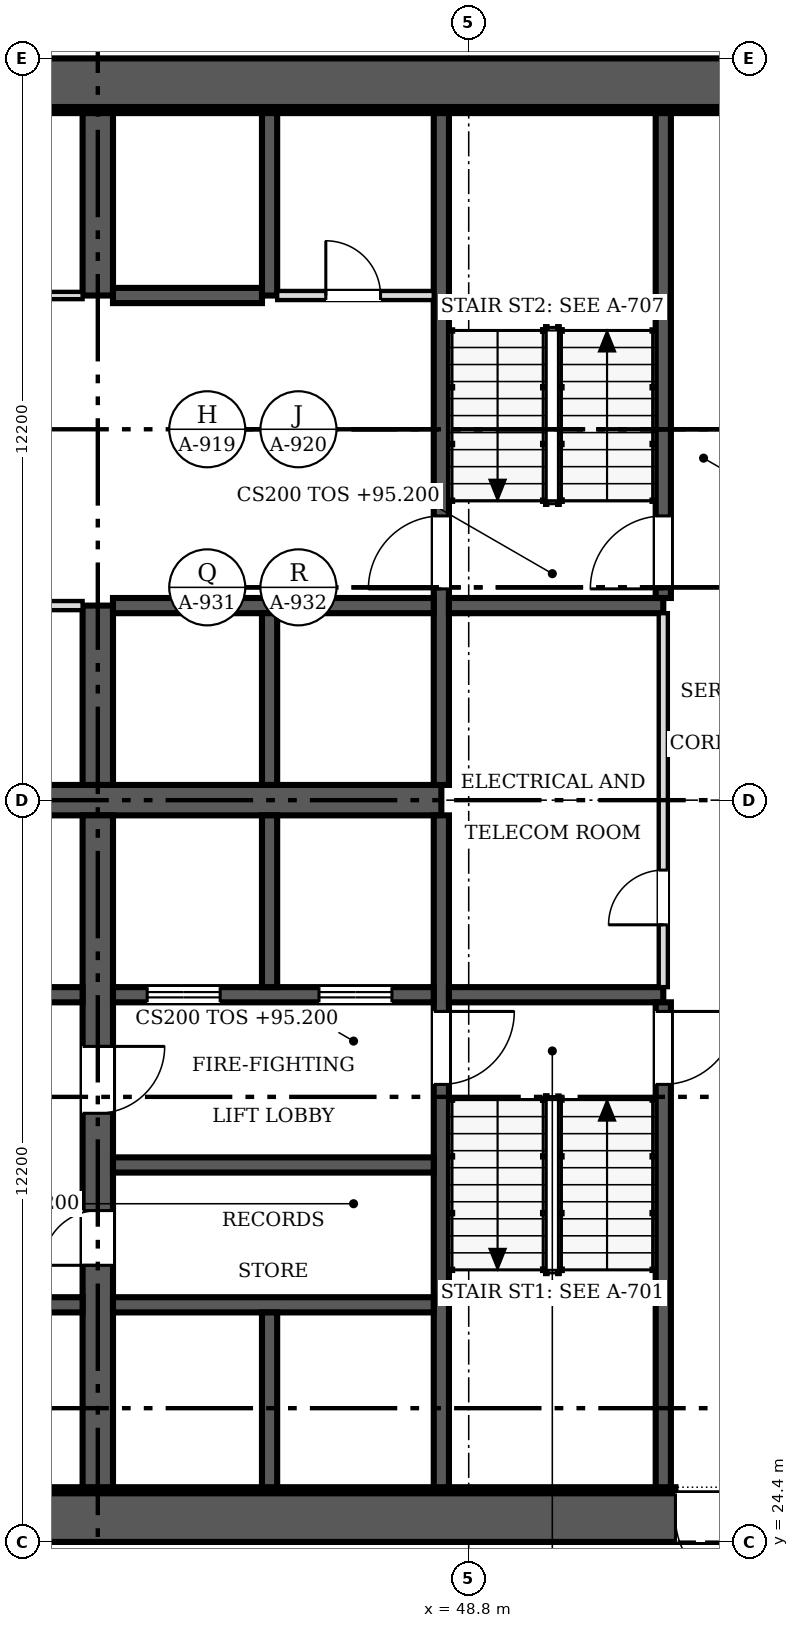
"""IFC4 building model, lengths in metres.
Left out: names, types, materials, properties, quantities, classifications, styles, units other than length and angle.
Written with IfcOpenShell. Run it as: python <this file> out.ifc"""

import sys

from ifc_helpers import new_model, si_unit, direction, frame, frame_2d, origin, place, context, subcontext, project, spatial, rectangle, extrude, source, transform, mapped, element, fill, save


model = new_model("IFC4")
c1 = context("Model", 3, precision=1e-05, world=origin(), true_north=direction((0.0, 1.0)))
c2 = subcontext(c1, "Body", "Model", "MODEL_VIEW")
j1 = project(units=[si_unit("LENGTHUNIT", "METRE"), si_unit("PLANEANGLEUNIT", "RADIAN")], contexts=[c1])
p1 = place(None, origin())
s1 = spatial("IfcSite", under=j1, at=p1, CompositionType="ELEMENT")
p2 = place(p1, origin())
s2 = spatial("IfcBuilding", under=s1, at=p2, CompositionType="ELEMENT")
p3 = place(p2, frame((0.0, 0.0, 95.2)))
s3 = spatial("IfcBuildingStorey", under=s2, at=p3, CompositionType="ELEMENT", Elevation=95.2)
p4 = place(p3, frame((54.9, 24.8, 0.0), z_axis=(0.0, 0.0, 1.0), x_axis=(-1.0, 0.0, 0.0)))
e1 = element("IfcWall", 1, at=p4, inside=s3, PredefinedType="SHEAR", context=c2, shape_type="SweptSolid", body=[
    extrude(rectangle(XDim=24.4, YDim=0.8, at=frame_2d((12.2, 0.0))), origin(), (0.0, 0.0, 1.0), 3.8),
])
m1 = source(origin(), c2, "Body", "SweptSolid", [
    extrude(rectangle(XDim=1.2, YDim=2.1, at=frame_2d((0.6, 1.05))), frame((0.0, 0.41, 0.0), z_axis=(0.0, -1.0, 0.0), x_axis=(1.0, 0.0, 0.0)), (0.0, 0.0, 1.0), 0.82),
])
p5 = place(p4, frame((1.5, 0.0, 0.0)))
e2 = element("IfcOpeningElement", 2, at=p5, cuts=e1, PredefinedType="OPENING", context=c2, shape_type="MappedRepresentation", body=[
    mapped(m1, transform((0.0, 0.0, 0.0), scale=1.0)),
])
p6 = place(p3, frame((30.5, 48.4, 0.0), z_axis=(0.0, 0.0, 1.0), x_axis=(1.0, 0.0, 0.0)))
e3 = element("IfcWall", 3, at=p6, inside=s3, PredefinedType="SHEAR", context=c2, shape_type="SweptSolid", body=[
    extrude(rectangle(XDim=24.4, YDim=0.8, at=frame_2d((12.2, 0.0))), origin(), (0.0, 0.0, 1.0), 3.8),
])
p7 = place(p3, frame((31.3, 25.25, 0.0), z_axis=(0.0, 0.0, 1.0), x_axis=(1.0, 0.0, 0.0)))
e4 = element("IfcWall", 4, at=p7, inside=s3, PredefinedType="SOLIDWALL", context=c2, shape_type="SweptSolid", body=[
    extrude(rectangle(XDim=20.9, YDim=0.1, at=frame_2d((10.45, 0.0))), origin(), (0.0, 0.0, 1.0), 3.8),
])
p8 = place(p3, frame((31.3, 47.95, 0.0), z_axis=(0.0, 0.0, 1.0), x_axis=(1.0, 0.0, 0.0)))
e5 = element("IfcWall", 5, at=p8, inside=s3, PredefinedType="SOLIDWALL", context=c2, shape_type="SweptSolid", body=[
    extrude(rectangle(XDim=22.8, YDim=0.1, at=frame_2d((11.4, 0.0))), origin(), (0.0, 0.0, 1.0), 3.8),
])
p9 = place(p3, frame((31.4, 36.6, 0.0), z_axis=(0.0, 0.0, 1.0), x_axis=(1.0, 0.0, 0.0)))
e6 = element("IfcWall", 6, at=p9, inside=s3, PredefinedType="SHEAR", context=c2, shape_type="SweptSolid", body=[
    extrude(rectangle(XDim=16.95, YDim=0.5, at=frame_2d((8.475, 0.0))), origin(), (0.0, 0.0, 1.0), 3.8),
])
p10 = place(p3, frame((42.7, 36.35, 0.0), z_axis=(0.0, 0.0, 1.0), x_axis=(0.0, -1.0, 0.0)))
e7 = element("IfcWall", 7, at=p10, inside=s3, PredefinedType="SHEAR", context=c2, shape_type="SweptSolid", body=[
    extrude(rectangle(XDim=11.05, YDim=0.5, at=frame_2d((5.525, 0.0))), origin(), (0.0, 0.0, 1.0), 3.8),
])
m2 = source(origin(), c2, "Body", "SweptSolid", [
    extrude(rectangle(XDim=0.9, YDim=2.1, at=frame_2d((0.45, 1.05))), frame((0.0, 0.26, 0.0), z_axis=(0.0, -1.0, 0.0), x_axis=(1.0, 0.0, 0.0)), (0.0, 0.0, 1.0), 0.52),
])
p11 = place(p10, frame((6.5, 0.0, 0.0)))
e8 = element("IfcOpeningElement", 8, at=p11, cuts=e7, PredefinedType="OPENING", context=c2, shape_type="MappedRepresentation", body=[
    mapped(m2, transform((0.0, 0.0, 0.0), scale=1.0)),
])
m3 = source(origin(), c2, "Body", "SweptSolid", [
    extrude(rectangle(XDim=1.1, YDim=2.1, at=frame_2d((0.55, 1.05))), frame((0.0, 0.26, 0.0), z_axis=(0.0, -1.0, 0.0), x_axis=(1.0, 0.0, 0.0)), (0.0, 0.0, 1.0), 0.52),
])
p12 = place(p10, frame((3.8, 0.0, 0.0)))
e9 = element("IfcOpeningElement", 9, at=p12, cuts=e7, PredefinedType="OPENING", context=c2, shape_type="MappedRepresentation", body=[
    mapped(m3, transform((0.0, 0.0, 0.0), scale=1.0)),
])
p13 = place(p3, frame((42.7, 36.85, 0.0), z_axis=(0.0, 0.0, 1.0), x_axis=(0.0, 1.0, 0.0)))
e10 = element("IfcWall", 10, at=p13, inside=s3, PredefinedType="SHEAR", context=c2, shape_type="SweptSolid", body=[
    extrude(rectangle(XDim=2.95, YDim=0.5, at=frame_2d((1.475, 0.0))), origin(), (0.0, 0.0, 1.0), 3.8),
])
p14 = place(p3, frame((42.7, 44.9, 0.0), z_axis=(0.0, 0.0, 1.0), x_axis=(0.0, 1.0, 0.0)))
e11 = element("IfcWall", 11, at=p14, inside=s3, PredefinedType="SHEAR", context=c2, shape_type="SweptSolid", body=[
    extrude(rectangle(XDim=3.0, YDim=0.5, at=frame_2d((1.5, 0.0))), origin(), (0.0, 0.0, 1.0), 3.8),
])
p15 = place(p3, frame((48.35, 36.35, 0.0), z_axis=(0.0, 0.0, 1.0), x_axis=(0.0, -1.0, 0.0)))
e12 = element("IfcWall", 12, at=p15, inside=s3, PredefinedType="SOLIDWALL", context=c2, shape_type="SweptSolid", body=[
    extrude(rectangle(XDim=11.05, YDim=0.25, at=frame_2d((5.525, 0.0))), origin(), (0.0, 0.0, 1.0), 3.8),
])
m4 = source(origin(), c2, "Body", "SweptSolid", [
    extrude(rectangle(XDim=1.2, YDim=2.1, at=frame_2d((0.6, 1.05))), frame((0.0, 0.135, 0.0), z_axis=(0.0, -1.0, 0.0), x_axis=(1.0, 0.0, 0.0)), (0.0, 0.0, 1.0), 0.27),
])
p16 = place(p15, frame((3.225, 0.0, 0.0)))
e13 = element("IfcOpeningElement", 13, at=p16, cuts=e12, PredefinedType="OPENING", context=c2, shape_type="MappedRepresentation", body=[
    mapped(m4, transform((0.0, 0.0, 0.0), scale=1.0)),
])
p17 = place(p3, frame((48.35, 47.9, 0.0), z_axis=(0.0, 0.0, 1.0), x_axis=(0.0, -1.0, 0.0)))
e14 = element("IfcWall", 14, at=p17, inside=s3, PredefinedType="SOLIDWALL", context=c2, shape_type="SweptSolid", body=[
    extrude(rectangle(XDim=11.05, YDim=0.25, at=frame_2d((5.525, 0.0))), origin(), (0.0, 0.0, 1.0), 3.8),
])
p18 = place(p17, frame((6.625, 0.0, 0.0)))
e15 = element("IfcOpeningElement", 15, at=p18, cuts=e14, PredefinedType="OPENING", context=c2, shape_type="MappedRepresentation", body=[
    mapped(m4, transform((0.0, 0.0, 0.0), scale=1.0)),
])
p19 = place(p3, frame((42.45, 33.4, 0.0), z_axis=(0.0, 0.0, 1.0), x_axis=(-1.0, 0.0, 0.0)))
e16 = element("IfcWall", 16, at=p19, inside=s3, PredefinedType="SOLIDWALL", context=c2, shape_type="SweptSolid", body=[
    extrude(rectangle(XDim=11.05, YDim=0.25, at=frame_2d((5.525, 0.0))), origin(), (0.0, 0.0, 1.0), 3.8),
])
m5 = source(origin(), c2, "Body", "SweptSolid", [
    extrude(rectangle(XDim=1.1, YDim=2.1, at=frame_2d((0.55, 1.05))), frame((0.0, 0.135, 0.0), z_axis=(0.0, -1.0, 0.0), x_axis=(1.0, 0.0, 0.0)), (0.0, 0.0, 1.0), 0.27),
])
p20 = place(p19, frame((9.087, 0.0, 0.0)))
e17 = element("IfcOpeningElement", 17, at=p20, cuts=e16, PredefinedType="OPENING", context=c2, shape_type="MappedRepresentation", body=[
    mapped(m5, transform((0.0, 0.0, 0.0), scale=1.0)),
])
p21 = place(p19, frame((6.262, 0.0, 0.0)))
e18 = element("IfcOpeningElement", 18, at=p21, cuts=e16, PredefinedType="OPENING", context=c2, shape_type="MappedRepresentation", body=[
    mapped(m5, transform((0.0, 0.0, 0.0), scale=1.0)),
])
p22 = place(p19, frame((3.438, 0.0, 0.0)))
e19 = element("IfcOpeningElement", 19, at=p22, cuts=e16, PredefinedType="OPENING", context=c2, shape_type="MappedRepresentation", body=[
    mapped(m5, transform((0.0, 0.0, 0.0), scale=1.0)),
])
p23 = place(p19, frame((0.613, 0.0, 0.0)))
e20 = element("IfcOpeningElement", 20, at=p23, cuts=e16, PredefinedType="OPENING", context=c2, shape_type="MappedRepresentation", body=[
    mapped(m5, transform((0.0, 0.0, 0.0), scale=1.0)),
])
p24 = place(p3, frame((48.225, 33.4, 0.0), z_axis=(0.0, 0.0, 1.0), x_axis=(-1.0, 0.0, 0.0)))
e21 = element("IfcWall", 21, at=p24, inside=s3, PredefinedType="SOLIDWALL", context=c2, shape_type="SweptSolid", body=[
    extrude(rectangle(XDim=5.275, YDim=0.25, at=frame_2d((2.638, 0.0))), origin(), (0.0, 0.0, 1.0), 3.8),
])
p25 = place(p24, frame((3.512, 0.0, 0.0)))
e22 = element("IfcOpeningElement", 22, at=p25, cuts=e21, PredefinedType="OPENING", context=c2, shape_type="MappedRepresentation", body=[
    mapped(m4, transform((0.0, 0.0, 0.0), scale=1.0)),
])
p26 = place(p24, frame((0.688, 0.0, 0.0)))
e23 = element("IfcOpeningElement", 23, at=p26, cuts=e21, PredefinedType="OPENING", context=c2, shape_type="MappedRepresentation", body=[
    mapped(m4, transform((0.0, 0.0, 0.0), scale=1.0)),
])
p27 = place(p3, frame((48.475, 33.4, 0.0), z_axis=(0.0, 0.0, 1.0), x_axis=(1.0, 0.0, 0.0)))
e24 = element("IfcWall", 24, at=p27, inside=s3, PredefinedType="SOLIDWALL", context=c2, shape_type="SweptSolid", body=[
    extrude(rectangle(XDim=3.525, YDim=0.25, at=frame_2d((1.762, 0.0))), origin(), (0.0, 0.0, 1.0), 3.8),
])
p28 = place(p3, frame((31.4, 28.3, 0.0), z_axis=(0.0, 0.0, 1.0), x_axis=(1.0, 0.0, 0.0)))
e25 = element("IfcWall", 25, at=p28, inside=s3, PredefinedType="SOLIDWALL", context=c2, shape_type="SweptSolid", body=[
    extrude(rectangle(XDim=11.05, YDim=0.25, at=frame_2d((5.525, 0.0))), origin(), (0.0, 0.0, 1.0), 3.8),
])
p29 = place(p28, frame((0.863, 0.0, 0.0)))
e26 = element("IfcOpeningElement", 26, at=p29, cuts=e25, PredefinedType="OPENING", context=c2, shape_type="MappedRepresentation", body=[
    mapped(m5, transform((0.0, 0.0, 0.0), scale=1.0)),
])
p30 = place(p28, frame((3.688, 0.0, 0.0)))
e27 = element("IfcOpeningElement", 27, at=p30, cuts=e25, PredefinedType="OPENING", context=c2, shape_type="MappedRepresentation", body=[
    mapped(m5, transform((0.0, 0.0, 0.0), scale=1.0)),
])
p31 = place(p28, frame((6.512, 0.0, 0.0)))
e28 = element("IfcOpeningElement", 28, at=p31, cuts=e25, PredefinedType="OPENING", context=c2, shape_type="MappedRepresentation", body=[
    mapped(m5, transform((0.0, 0.0, 0.0), scale=1.0)),
])
p32 = place(p28, frame((9.337, 0.0, 0.0)))
e29 = element("IfcOpeningElement", 29, at=p32, cuts=e25, PredefinedType="OPENING", context=c2, shape_type="MappedRepresentation", body=[
    mapped(m5, transform((0.0, 0.0, 0.0), scale=1.0)),
])
for number, where, z_axis, x_axis in (
    (30, (42.95, 28.3, 0.0), (0.0, 0.0, 1.0), (1.0, 0.0, 0.0)),
    (31, (42.95, 39.8, 0.0), (0.0, 0.0, 1.0), (1.0, 0.0, 0.0)),
):
    element("IfcWall", number, at=place(p3, frame(where, z_axis=z_axis, x_axis=x_axis)), inside=s3, PredefinedType="SOLIDWALL", context=c2, shape_type="SweptSolid", body=[
        extrude(rectangle(XDim=5.275, YDim=0.25, at=frame_2d((2.638, 0.0))), origin(), (0.0, 0.0, 1.0), 3.8),
    ])
p33 = place(p3, frame((48.475, 39.8, 0.0), z_axis=(0.0, 0.0, 1.0), x_axis=(1.0, 0.0, 0.0)))
e32 = element("IfcWall", 32, at=p33, inside=s3, PredefinedType="SOLIDWALL", context=c2, shape_type="SweptSolid", body=[
    extrude(rectangle(XDim=3.525, YDim=0.25, at=frame_2d((1.762, 0.0))), origin(), (0.0, 0.0, 1.0), 3.8),
])
p34 = place(p3, frame((52.0, 25.3, 0.0), z_axis=(0.0, 0.0, 1.0), x_axis=(0.0, 1.0, 0.0)))
e33 = element("IfcWall", 33, at=p34, inside=s3, PredefinedType="SOLIDWALL", context=c2, shape_type="SweptSolid", body=[
    extrude(rectangle(XDim=7.975, YDim=0.25, at=frame_2d((3.987, 0.0))), origin(), (0.0, 0.0, 1.0), 3.8),
])
p35 = place(p34, frame((6.625, 0.0, 0.0)))
e34 = element("IfcOpeningElement", 34, at=p35, cuts=e33, PredefinedType="OPENING", context=c2, shape_type="MappedRepresentation", body=[
    mapped(m4, transform((0.0, 0.0, 0.0), scale=1.0)),
])
p36 = place(p3, frame((52.0, 39.925, 0.0), z_axis=(0.0, 0.0, 1.0), x_axis=(0.0, 1.0, 0.0)))
e35 = element("IfcWall", 35, at=p36, inside=s3, PredefinedType="SOLIDWALL", context=c2, shape_type="SweptSolid", body=[
    extrude(rectangle(XDim=7.975, YDim=0.25, at=frame_2d((3.987, 0.0))), origin(), (0.0, 0.0, 1.0), 3.8),
])
p37 = place(p36, frame((0.15, 0.0, 0.0)))
e36 = element("IfcOpeningElement", 36, at=p37, cuts=e35, PredefinedType="OPENING", context=c2, shape_type="MappedRepresentation", body=[
    mapped(m4, transform((0.0, 0.0, 0.0), scale=1.0)),
])
p38 = place(p3, frame((45.525, 33.525, 0.0), z_axis=(0.0, 0.0, 1.0), x_axis=(0.0, 1.0, 0.0)))
e37 = element("IfcWall", 37, at=p38, inside=s3, PredefinedType="SOLIDWALL", context=c2, shape_type="SweptSolid", body=[
    extrude(rectangle(XDim=2.825, YDim=0.25, at=frame_2d((1.413, 0.0))), origin(), (0.0, 0.0, 1.0), 3.8),
])
p39 = place(p3, frame((45.525, 36.85, 0.0), z_axis=(0.0, 0.0, 1.0), x_axis=(0.0, 1.0, 0.0)))
e38 = element("IfcWall", 38, at=p39, inside=s3, PredefinedType="SOLIDWALL", context=c2, shape_type="SweptSolid", body=[
    extrude(rectangle(XDim=2.825, YDim=0.25, at=frame_2d((1.413, 0.0))), origin(), (0.0, 0.0, 1.0), 3.8),
])
p40 = place(p3, frame((42.95, 30.6, 0.0), z_axis=(0.0, 0.0, 1.0), x_axis=(1.0, 0.0, 0.0)))
e39 = element("IfcWall", 39, at=p40, inside=s3, PredefinedType="SOLIDWALL", context=c2, shape_type="SweptSolid", body=[
    extrude(rectangle(XDim=5.275, YDim=0.25, at=frame_2d((2.638, 0.0))), origin(), (0.0, 0.0, 1.0), 3.8),
])
p41 = place(p3, frame((45.525, 25.3, 0.0), z_axis=(0.0, 0.0, 1.0), x_axis=(0.0, 1.0, 0.0)))
e40 = element("IfcWall", 40, at=p41, inside=s3, PredefinedType="SOLIDWALL", context=c2, shape_type="SweptSolid", body=[
    extrude(rectangle(XDim=2.875, YDim=0.25, at=frame_2d((1.438, 0.0))), origin(), (0.0, 0.0, 1.0), 3.8),
])
p42 = place(p3, frame((45.525, 44.9, 0.0), z_axis=(0.0, 0.0, 1.0), x_axis=(0.0, 1.0, 0.0)))
e41 = element("IfcWall", 41, at=p42, inside=s3, PredefinedType="SOLIDWALL", context=c2, shape_type="SweptSolid", body=[
    extrude(rectangle(XDim=3.0, YDim=0.25, at=frame_2d((1.5, 0.0))), origin(), (0.0, 0.0, 1.0), 3.8),
])
p43 = place(p3, frame((42.95, 44.9, 0.0), z_axis=(0.0, 0.0, 1.0), x_axis=(1.0, 0.0, 0.0)))
e42 = element("IfcWall", 42, at=p43, inside=s3, PredefinedType="SOLIDWALL", context=c2, shape_type="SweptSolid", body=[
    extrude(rectangle(XDim=2.45, YDim=0.25, at=frame_2d((1.225, 0.0))), origin(), (0.0, 0.0, 1.0), 3.8),
])
p44 = place(p3, frame((31.4, 44.9, 0.0), z_axis=(0.0, 0.0, 1.0), x_axis=(1.0, 0.0, 0.0)))
e43 = element("IfcWall", 43, at=p44, inside=s3, PredefinedType="PARTITIONING", context=c2, shape_type="SweptSolid", body=[
    extrude(rectangle(XDim=11.05, YDim=0.12, at=frame_2d((5.525, 0.0))), origin(), (0.0, 0.0, 1.0), 3.6),
])
m6 = source(origin(), c2, "Body", "SweptSolid", [
    extrude(rectangle(XDim=0.9, YDim=2.1, at=frame_2d((0.45, 1.05))), frame((0.0, 0.07, 0.0), z_axis=(0.0, -1.0, 0.0), x_axis=(1.0, 0.0, 0.0)), (0.0, 0.0, 1.0), 0.14),
])
p45 = place(p44, frame((0.962, 0.0, 0.0)))
e44 = element("IfcOpeningElement", 44, at=p45, cuts=e43, PredefinedType="OPENING", context=c2, shape_type="MappedRepresentation", body=[
    mapped(m6, transform((0.0, 0.0, 0.0), scale=1.0)),
])
p46 = place(p44, frame((6.613, 0.0, 0.0)))
e45 = element("IfcOpeningElement", 45, at=p46, cuts=e43, PredefinedType="OPENING", context=c2, shape_type="MappedRepresentation", body=[
    mapped(m6, transform((0.0, 0.0, 0.0), scale=1.0)),
])
p47 = place(p3, frame((52.0, 33.525, 0.0), z_axis=(0.0, 0.0, 1.0), x_axis=(0.0, 1.0, 0.0)))
e46 = element("IfcWall", 46, at=p47, inside=s3, PredefinedType="PARTITIONING", context=c2, shape_type="SweptSolid", body=[
    extrude(rectangle(XDim=6.15, YDim=0.15, at=frame_2d((3.075, 0.0))), origin(), (0.0, 0.0, 1.0), 3.6),
])
m7 = source(origin(), c2, "Body", "SweptSolid", [
    extrude(rectangle(XDim=0.9, YDim=2.1, at=frame_2d((0.45, 1.05))), frame((0.0, 0.085, 0.0), z_axis=(0.0, -1.0, 0.0), x_axis=(1.0, 0.0, 0.0)), (0.0, 0.0, 1.0), 0.17),
])
p48 = place(p47, frame((1.025, 0.0, 0.0)))
e47 = element("IfcOpeningElement", 47, at=p48, cuts=e46, PredefinedType="OPENING", context=c2, shape_type="MappedRepresentation", body=[
    mapped(m7, transform((0.0, 0.0, 0.0), scale=1.0)),
])
p49 = place(p3, frame((45.65, 44.9, 0.0), z_axis=(0.0, 0.0, 1.0), x_axis=(1.0, 0.0, 0.0)))
e48 = element("IfcWall", 48, at=p49, inside=s3, PredefinedType="PARTITIONING", context=c2, shape_type="SweptSolid", body=[
    extrude(rectangle(XDim=2.575, YDim=0.15, at=frame_2d((1.288, 0.0))), origin(), (0.0, 0.0, 1.0), 3.6),
])
p50 = place(p49, frame((0.8, 0.0, 0.0)))
e49 = element("IfcOpeningElement", 49, at=p50, cuts=e48, PredefinedType="OPENING", context=c2, shape_type="MappedRepresentation", body=[
    mapped(m7, transform((0.0, 0.0, 0.0), scale=1.0)),
])
p51 = place(p3, frame((42.45, 39.8, 0.0), z_axis=(0.0, 0.0, 1.0), x_axis=(-1.0, 0.0, 0.0)))
e50 = element("IfcWall", 50, at=p51, inside=s3, PredefinedType="PARTITIONING", context=c2, shape_type="SweptSolid", body=[
    extrude(rectangle(XDim=2.5, YDim=0.15, at=frame_2d((1.25, 0.0))), origin(), (0.0, 0.0, 1.0), 3.6),
])
p52 = place(p51, frame((0.712, 0.0, 0.0)))
e51 = element("IfcOpeningElement", 51, at=p52, cuts=e50, PredefinedType="OPENING", context=c2, shape_type="MappedRepresentation", body=[
    mapped(m7, transform((0.0, 0.0, 0.0), scale=1.0)),
])
m8 = source(origin(), c2, "Body", "SweptSolid", [
    extrude(rectangle(XDim=1.2, YDim=2.1, at=frame_2d((0.6, 1.05))), frame((0.0, 0.025, 0.0), z_axis=(0.0, -1.0, 0.0), x_axis=(1.0, 0.0, 0.0)), (0.0, 0.0, 1.0), 0.05),
])
p53 = place(p5, origin())
e52 = element("IfcDoor", 52, at=p53, inside=s3, OperationType="SINGLE_SWING_LEFT", PredefinedType="DOOR", context=c2, shape_type="MappedRepresentation", body=[
    mapped(m8, transform((0.0, 0.0, 0.0), scale=1.0)),
])
fill(e2, e52)
m9 = source(origin(), c2, "Body", "SweptSolid", [
    extrude(rectangle(XDim=0.9, YDim=2.1, at=frame_2d((0.45, 1.05))), frame((0.0, 0.025, 0.0), z_axis=(0.0, -1.0, 0.0), x_axis=(1.0, 0.0, 0.0)), (0.0, 0.0, 1.0), 0.05),
])
p54 = place(p11, origin())
e53 = element("IfcDoor", 53, at=p54, inside=s3, OperationType="SINGLE_SWING_RIGHT", PredefinedType="DOOR", context=c2, shape_type="MappedRepresentation", body=[
    mapped(m9, transform((0.0, 0.0, 0.0), scale=1.0)),
])
fill(e8, e53)
m10 = source(origin(), c2, "Body", "SweptSolid", [
    extrude(rectangle(XDim=1.1, YDim=2.1, at=frame_2d((0.55, 1.05))), frame((0.0, 0.025, 0.0), z_axis=(0.0, -1.0, 0.0), x_axis=(1.0, 0.0, 0.0)), (0.0, 0.0, 1.0), 0.05),
])
p55 = place(p12, origin())
e54 = element("IfcDoor", 54, at=p55, inside=s3, OperationType="SINGLE_SWING_LEFT", PredefinedType="DOOR", context=c2, shape_type="MappedRepresentation", body=[
    mapped(m10, transform((0.0, 0.0, 0.0), scale=1.0)),
])
fill(e9, e54)
p56 = place(p16, origin())
e55 = element("IfcDoor", 55, at=p56, inside=s3, OperationType="SINGLE_SWING_LEFT", PredefinedType="DOOR", context=c2, shape_type="MappedRepresentation", body=[
    mapped(m8, transform((0.0, 0.0, 0.0), scale=1.0)),
])
fill(e13, e55)
p57 = place(p18, origin())
e56 = element("IfcDoor", 56, at=p57, inside=s3, OperationType="SINGLE_SWING_RIGHT", PredefinedType="DOOR", context=c2, shape_type="MappedRepresentation", body=[
    mapped(m8, transform((0.0, 0.0, 0.0), scale=1.0)),
])
fill(e15, e56)
p58 = place(p25, origin())
e57 = element("IfcDoor", 57, at=p58, inside=s3, OperationType="DOUBLE_DOOR_SLIDING", PredefinedType="DOOR", context=c2, shape_type="MappedRepresentation", body=[
    mapped(m8, transform((0.0, 0.0, 0.0), scale=1.0)),
])
fill(e22, e57)
p59 = place(p26, origin())
e58 = element("IfcDoor", 58, at=p59, inside=s3, OperationType="DOUBLE_DOOR_SLIDING", PredefinedType="DOOR", context=c2, shape_type="MappedRepresentation", body=[
    mapped(m8, transform((0.0, 0.0, 0.0), scale=1.0)),
])
fill(e23, e58)
p60 = place(p35, origin())
e59 = element("IfcDoor", 59, at=p60, inside=s3, OperationType="SINGLE_SWING_RIGHT", PredefinedType="DOOR", context=c2, shape_type="MappedRepresentation", body=[
    mapped(m8, transform((0.0, 0.0, 0.0), scale=1.0)),
])
fill(e34, e59)
p61 = place(p37, origin())
e60 = element("IfcDoor", 60, at=p61, inside=s3, OperationType="SINGLE_SWING_LEFT", PredefinedType="DOOR", context=c2, shape_type="MappedRepresentation", body=[
    mapped(m8, transform((0.0, 0.0, 0.0), scale=1.0)),
])
fill(e36, e60)
p62 = place(p48, origin())
e61 = element("IfcDoor", 61, at=p62, inside=s3, OperationType="SINGLE_SWING_LEFT", PredefinedType="DOOR", context=c2, shape_type="MappedRepresentation", body=[
    mapped(m9, transform((0.0, 0.0, 0.0), scale=1.0)),
])
fill(e47, e61)
p63 = place(p50, origin())
e62 = element("IfcDoor", 62, at=p63, inside=s3, OperationType="SINGLE_SWING_LEFT", PredefinedType="DOOR", context=c2, shape_type="MappedRepresentation", body=[
    mapped(m9, transform((0.0, 0.0, 0.0), scale=1.0)),
])
fill(e49, e62)
save(model, sys.argv[1])
